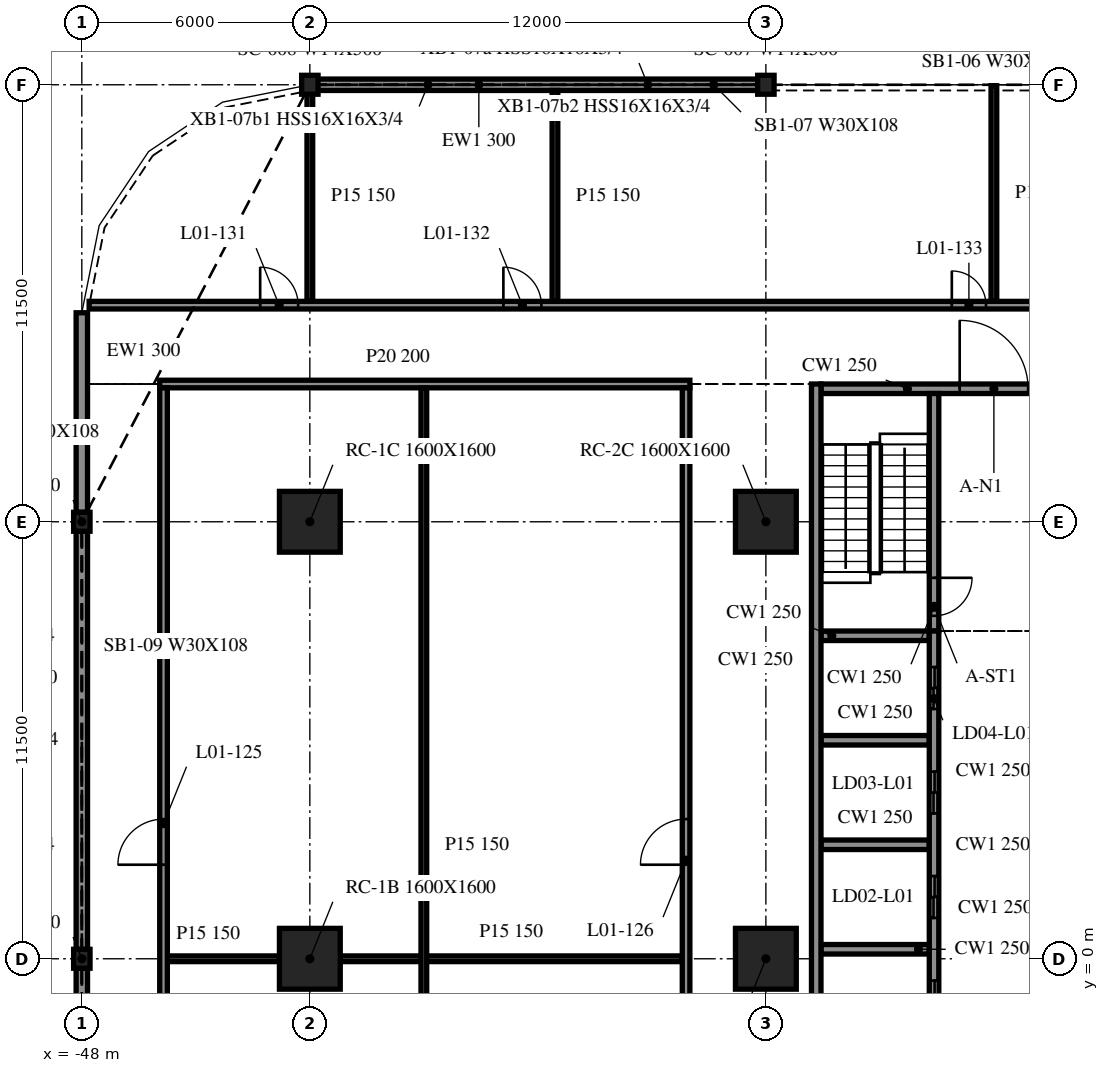
"""IFC4 building model, lengths in metres.
Left out: names, types, materials, properties, quantities, classifications, styles, units other than length and angle.
Written with IfcOpenShell. Run it as: python <this file> out.ifc"""

import sys

from ifc_helpers import new_model, si_unit, direction, frame, frame_2d, origin, origin_2d, place, context, subcontext, project, spatial, rectangle, i_section, extrude, element, fill, save


model = new_model("IFC4")
c1 = context("Model", 3, precision=1e-05, world=origin(), true_north=direction((0.0, 1.0)))
c2 = subcontext(c1, "Body", "Model", "MODEL_VIEW")
j1 = project(units=[si_unit("LENGTHUNIT", "METRE"), si_unit("PLANEANGLEUNIT", "RADIAN")], contexts=[c1])
p1 = place(None, origin())
s1 = spatial("IfcSite", under=j1, at=p1, CompositionType="ELEMENT")
p2 = place(p1, origin())
s2 = spatial("IfcBuilding", under=s1, at=p2, CompositionType="ELEMENT")
p3 = place(p2, frame((0.0, 0.0, 7.2)))
s3 = spatial("IfcBuildingStorey", under=s2, at=p3, CompositionType="ELEMENT", Elevation=7.2)
for number, where, z_axis, x_axis in (
    (1, (-42.0, 0.0, -0.34), (0.0, 0.0, 1.0), (1.0, 0.0, 0.0)),
    (2, (-42.0, 11.5, -0.34), (0.0, 0.0, 1.0), (1.0, 0.0, 0.0)),
    (3, (-30.0, 0.0, -0.34), (0.0, 0.0, 1.0), (1.0, 0.0, 0.0)),
    (4, (-30.0, 11.5, -0.34), (0.0, 0.0, 1.0), (1.0, 0.0, 0.0)),
):
    element("IfcColumn", number, at=place(p3, frame(where, z_axis=z_axis, x_axis=x_axis)), inside=s3, PredefinedType="COLUMN", context=c2, shape_type="SweptSolid", body=[
        extrude(rectangle(XDim=1.6, YDim=1.6, at=origin_2d()), origin(), (0.0, 0.0, 1.0), 4.3),
    ])
for number, where, z_axis, x_axis in (
    (5, (-30.0, 23.0, -0.34), (0.0, 0.0, 1.0), (1.0, 0.0, 0.0)),
    (6, (-42.0, 23.0, -0.34), (0.0, 0.0, 1.0), (1.0, 0.0, 0.0)),
    (7, (-48.0, 11.5, -0.34), (0.0, 0.0, 1.0), (1.0, 0.0, 0.0)),
    (8, (-48.0, 0.0, -0.34), (0.0, 0.0, 1.0), (1.0, 0.0, 0.0)),
):
    element("IfcColumn", number, at=place(p3, frame(where, z_axis=z_axis, x_axis=x_axis)), inside=s3, PredefinedType="COLUMN", context=c2, shape_type="SweptSolid", body=[
        extrude(i_section(OverallWidth=0.432, OverallDepth=0.498, WebThickness=0.056, FlangeThickness=0.089, at=origin_2d()), origin(), (0.0, 0.0, 1.0), 4.3),
    ])
p4 = place(p3, frame((-30.028, 23.0, 0.0), z_axis=(0.0, 0.0, 1.0), x_axis=(-1.0, 0.0, 0.0)))
e9 = element("IfcWall", 9, at=p4, inside=s3, PredefinedType="NOTDEFINED", context=c2, shape_type="SweptSolid", body=[
    extrude(rectangle(XDim=11.944, YDim=0.3, at=frame_2d((5.972, 0.0))), origin(), (0.0, 0.0, 1.0), 3.203),
])
p5 = place(p3, frame((-48.0, 17.0, 0.0), z_axis=(0.0, 0.0, 1.0), x_axis=(0.0, -1.0, 0.0)))
e10 = element("IfcWall", 10, at=p5, inside=s3, PredefinedType="NOTDEFINED", context=c2, shape_type="SweptSolid", body=[
    extrude(rectangle(XDim=5.251, YDim=0.3, at=frame_2d((2.625, 0.0))), origin(), (0.0, 0.0, 1.0), 3.203),
])
for number, where, z_axis, x_axis in (
    (11, (-48.0, 11.251, 0.0), (0.0, 0.0, 1.0), (0.0, -1.0, 0.0)),
    (12, (-48.0, -0.249, 0.0), (0.0, 0.0, 1.0), (0.0, -1.0, 0.0)),
):
    element("IfcWall", number, at=place(p3, frame(where, z_axis=z_axis, x_axis=x_axis)), inside=s3, PredefinedType="NOTDEFINED", context=c2, shape_type="SweptSolid", body=[
        extrude(rectangle(XDim=11.002, YDim=0.3, at=frame_2d((5.501, 0.0))), origin(), (0.0, 0.0, 1.0), 3.203),
    ])
p6 = place(p3, frame((-28.675, 15.125, 0.0), z_axis=(0.0, 0.0, 1.0), x_axis=(0.0, -1.0, 0.0)))
e13 = element("IfcWall", 13, at=p6, inside=s3, PredefinedType="SOLIDWALL", context=c2, shape_type="SweptSolid", body=[
    extrude(rectangle(XDim=24.25, YDim=0.25, at=frame_2d((12.125, 0.0))), origin(), (0.0, 0.0, 1.0), 3.96),
])
p7 = place(p3, frame((-28.55, 15.0, 0.0), z_axis=(0.0, 0.0, 1.0), x_axis=(1.0, 0.0, 0.0)))
e14 = element("IfcWall", 14, at=p7, inside=s3, PredefinedType="SOLIDWALL", context=c2, shape_type="SweptSolid", body=[
    extrude(rectangle(XDim=9.1, YDim=0.25, at=frame_2d((4.55, 0.0))), origin(), (0.0, 0.0, 1.0), 3.96),
])
p8 = place(p7, frame((3.65, 0.0, 0.0)))
e15 = element("IfcOpeningElement", 15, at=p8, cuts=e14, PredefinedType="OPENING", context=c2, shape_type="SweptSolid", body=[
    extrude(rectangle(XDim=1.8, YDim=2.1, at=frame_2d((0.9, 1.05))), frame((0.0, 0.135, 0.0), z_axis=(0.0, -1.0, 0.0), x_axis=(1.0, 0.0, 0.0)), (0.0, 0.0, 1.0), 0.27),
])
p9 = place(p3, frame((-25.575, -8.875, 0.0), z_axis=(0.0, 0.0, 1.0), x_axis=(0.0, 1.0, 0.0)))
e16 = element("IfcWall", 16, at=p9, inside=s3, PredefinedType="SOLIDWALL", context=c2, shape_type="SweptSolid", body=[
    extrude(rectangle(XDim=17.5, YDim=0.25, at=frame_2d((8.75, 0.0))), origin(), (0.0, 0.0, 1.0), 3.96),
])
p10 = place(p9, frame((7.2, 0.0, 0.0)))
e17 = element("IfcOpeningElement", 17, at=p10, cuts=e16, PredefinedType="OPENING", context=c2, shape_type="SweptSolid", body=[
    extrude(rectangle(XDim=1.1, YDim=2.1, at=frame_2d((0.55, 1.05))), frame((0.0, 0.135, 0.0), z_axis=(0.0, -1.0, 0.0), x_axis=(1.0, 0.0, 0.0)), (0.0, 0.0, 1.0), 0.27),
])
p11 = place(p9, frame((9.95, 0.0, 0.0)))
e18 = element("IfcOpeningElement", 18, at=p11, cuts=e16, PredefinedType="OPENING", context=c2, shape_type="SweptSolid", body=[
    extrude(rectangle(XDim=1.1, YDim=2.1, at=frame_2d((0.55, 1.05))), frame((0.0, 0.135, 0.0), z_axis=(0.0, -1.0, 0.0), x_axis=(1.0, 0.0, 0.0)), (0.0, 0.0, 1.0), 0.27),
])
p12 = place(p9, frame((12.7, 0.0, 0.0)))
e19 = element("IfcOpeningElement", 19, at=p12, cuts=e16, PredefinedType="OPENING", context=c2, shape_type="SweptSolid", body=[
    extrude(rectangle(XDim=1.1, YDim=2.1, at=frame_2d((0.55, 1.05))), frame((0.0, 0.135, 0.0), z_axis=(0.0, -1.0, 0.0), x_axis=(1.0, 0.0, 0.0)), (0.0, 0.0, 1.0), 0.27),
])
p13 = place(p9, frame((15.45, 0.0, 0.0)))
e20 = element("IfcOpeningElement", 20, at=p13, cuts=e16, PredefinedType="OPENING", context=c2, shape_type="SweptSolid", body=[
    extrude(rectangle(XDim=1.1, YDim=2.1, at=frame_2d((0.55, 1.05))), frame((0.0, 0.135, 0.0), z_axis=(0.0, -1.0, 0.0), x_axis=(1.0, 0.0, 0.0)), (0.0, 0.0, 1.0), 0.27),
])
p14 = place(p9, frame((0.512, 0.0, 0.0)))
e21 = element("IfcOpeningElement", 21, at=p14, cuts=e16, PredefinedType="OPENING", context=c2, shape_type="SweptSolid", body=[
    extrude(rectangle(XDim=0.9, YDim=2.1, at=frame_2d((0.45, 1.05))), frame((0.0, 0.135, 0.0), z_axis=(0.0, -1.0, 0.0), x_axis=(1.0, 0.0, 0.0)), (0.0, 0.0, 1.0), 0.27),
])
p15 = place(p9, frame((2.55, 0.0, 0.0)))
e22 = element("IfcOpeningElement", 22, at=p15, cuts=e16, PredefinedType="OPENING", context=c2, shape_type="SweptSolid", body=[
    extrude(rectangle(XDim=0.9, YDim=2.1, at=frame_2d((0.45, 1.05))), frame((0.0, 0.135, 0.0), z_axis=(0.0, -1.0, 0.0), x_axis=(1.0, 0.0, 0.0)), (0.0, 0.0, 1.0), 0.27),
])
p16 = place(p9, frame((4.587, 0.0, 0.0)))
e23 = element("IfcOpeningElement", 23, at=p16, cuts=e16, PredefinedType="OPENING", context=c2, shape_type="SweptSolid", body=[
    extrude(rectangle(XDim=0.9, YDim=2.1, at=frame_2d((0.45, 1.05))), frame((0.0, 0.135, 0.0), z_axis=(0.0, -1.0, 0.0), x_axis=(1.0, 0.0, 0.0)), (0.0, 0.0, 1.0), 0.27),
])
p17 = place(p3, frame((-25.575, 14.875, 0.0), z_axis=(0.0, 0.0, 1.0), x_axis=(0.0, -1.0, 0.0)))
e24 = element("IfcWall", 24, at=p17, inside=s3, PredefinedType="SOLIDWALL", context=c2, shape_type="SweptSolid", body=[
    extrude(rectangle(XDim=6.25, YDim=0.25, at=frame_2d((3.125, 0.0))), origin(), (0.0, 0.0, 1.0), 3.96),
])
p18 = place(p17, frame((4.85, 0.0, 0.0)))
e25 = element("IfcOpeningElement", 25, at=p18, cuts=e24, PredefinedType="OPENING", context=c2, shape_type="SweptSolid", body=[
    extrude(rectangle(XDim=1.0, YDim=2.1, at=frame_2d((0.5, 1.05))), frame((0.0, 0.135, 0.0), z_axis=(0.0, -1.0, 0.0), x_axis=(1.0, 0.0, 0.0)), (0.0, 0.0, 1.0), 0.27),
])
for number, where, z_axis, x_axis in (
    (26, (-28.55, 0.25, 0.0), (0.0, 0.0, 1.0), (1.0, 0.0, 0.0)),
    (27, (-28.55, 3.0, 0.0), (0.0, 0.0, 1.0), (1.0, 0.0, 0.0)),
    (28, (-28.55, 5.75, 0.0), (0.0, 0.0, 1.0), (1.0, 0.0, 0.0)),
    (29, (-28.55, 8.5, 0.0), (0.0, 0.0, 1.0), (1.0, 0.0, 0.0)),
):
    element("IfcWall", number, at=place(p3, frame(where, z_axis=z_axis, x_axis=x_axis)), inside=s3, PredefinedType="SOLIDWALL", context=c2, shape_type="SweptSolid", body=[
        extrude(rectangle(XDim=2.85, YDim=0.25, at=frame_2d((1.425, 0.0))), origin(), (0.0, 0.0, 1.0), 3.96),
    ])
p19 = place(p3, frame((-45.75, 0.0, 0.0), z_axis=(0.0, 0.0, 1.0), x_axis=(1.0, 0.0, 0.0)))
e30 = element("IfcWall", 30, at=p19, inside=s3, PredefinedType="PARTITIONING", context=c2, shape_type="SweptSolid", body=[
    extrude(rectangle(XDim=2.95, YDim=0.15, at=frame_2d((1.475, 0.0))), origin(), (0.0, 0.0, 1.0), 3.96),
])
p20 = place(p3, frame((-41.2, 0.0, 0.0), z_axis=(0.0, 0.0, 1.0), x_axis=(1.0, 0.0, 0.0)))
e31 = element("IfcWall", 31, at=p20, inside=s3, PredefinedType="PARTITIONING", context=c2, shape_type="SweptSolid", body=[
    extrude(rectangle(XDim=9.0, YDim=0.15, at=frame_2d((4.5, 0.0))), origin(), (0.0, 0.0, 1.0), 3.96),
])
p21 = place(p3, frame((-45.95, 15.125, 0.0), z_axis=(0.0, 0.0, 1.0), x_axis=(1.0, 0.0, 0.0)))
e32 = element("IfcWall", 32, at=p21, inside=s3, PredefinedType="PARTITIONING", context=c2, shape_type="SweptSolid", body=[
    extrude(rectangle(XDim=13.95, YDim=0.2, at=frame_2d((6.975, 0.0))), origin(), (0.0, 0.0, 1.0), 3.96),
])
p22 = place(p3, frame((-47.807, 17.2, 0.0), z_axis=(0.0, 0.0, 1.0), x_axis=(1.0, 0.0, 0.0)))
e33 = element("IfcWall", 33, at=p22, inside=s3, PredefinedType="PARTITIONING", context=c2, shape_type="SweptSolid", body=[
    extrude(rectangle(XDim=95.615, YDim=0.2, at=frame_2d((47.807, 0.0))), origin(), (0.0, 0.0, 1.0), 3.96),
])
p23 = place(p22, frame((4.5, 0.0, 0.0)))
e34 = element("IfcOpeningElement", 34, at=p23, cuts=e33, PredefinedType="OPENING", context=c2, shape_type="SweptSolid", body=[
    extrude(rectangle(XDim=1.0, YDim=2.1, at=frame_2d((0.5, 1.05))), frame((0.0, 0.11, 0.0), z_axis=(0.0, -1.0, 0.0), x_axis=(1.0, 0.0, 0.0)), (0.0, 0.0, 1.0), 0.22),
])
p24 = place(p22, frame((10.9, 0.0, 0.0)))
e35 = element("IfcOpeningElement", 35, at=p24, cuts=e33, PredefinedType="OPENING", context=c2, shape_type="SweptSolid", body=[
    extrude(rectangle(XDim=1.0, YDim=2.1, at=frame_2d((0.5, 1.05))), frame((0.0, 0.11, 0.0), z_axis=(0.0, -1.0, 0.0), x_axis=(1.0, 0.0, 0.0)), (0.0, 0.0, 1.0), 0.22),
])
p25 = place(p22, frame((22.7, 0.0, 0.0)))
e36 = element("IfcOpeningElement", 36, at=p25, cuts=e33, PredefinedType="OPENING", context=c2, shape_type="SweptSolid", body=[
    extrude(rectangle(XDim=0.9, YDim=2.1, at=frame_2d((0.45, 1.05))), frame((0.0, 0.11, 0.0), z_axis=(0.0, -1.0, 0.0), x_axis=(1.0, 0.0, 0.0)), (0.0, 0.0, 1.0), 0.22),
])
p26 = place(p22, frame((25.7, 0.0, 0.0)))
e37 = element("IfcOpeningElement", 37, at=p26, cuts=e33, PredefinedType="OPENING", context=c2, shape_type="SweptSolid", body=[
    extrude(rectangle(XDim=1.2, YDim=2.1, at=frame_2d((0.6, 1.05))), frame((0.0, 0.11, 0.0), z_axis=(0.0, -1.0, 0.0), x_axis=(1.0, 0.0, 0.0)), (0.0, 0.0, 1.0), 0.22),
])
p27 = place(p22, frame((28.7, 0.0, 0.0)))
e38 = element("IfcOpeningElement", 38, at=p27, cuts=e33, PredefinedType="OPENING", context=c2, shape_type="SweptSolid", body=[
    extrude(rectangle(XDim=0.9, YDim=2.1, at=frame_2d((0.45, 1.05))), frame((0.0, 0.11, 0.0), z_axis=(0.0, -1.0, 0.0), x_axis=(1.0, 0.0, 0.0)), (0.0, 0.0, 1.0), 0.22),
])
p28 = place(p22, frame((34.5, 0.0, 0.0)))
e39 = element("IfcOpeningElement", 39, at=p28, cuts=e33, PredefinedType="OPENING", context=c2, shape_type="SweptSolid", body=[
    extrude(rectangle(XDim=1.0, YDim=2.1, at=frame_2d((0.5, 1.05))), frame((0.0, 0.11, 0.0), z_axis=(0.0, -1.0, 0.0), x_axis=(1.0, 0.0, 0.0)), (0.0, 0.0, 1.0), 0.22),
])
p29 = place(p22, frame((46.5, 0.0, 0.0)))
e40 = element("IfcOpeningElement", 40, at=p29, cuts=e33, PredefinedType="OPENING", context=c2, shape_type="SweptSolid", body=[
    extrude(rectangle(XDim=1.0, YDim=2.1, at=frame_2d((0.5, 1.05))), frame((0.0, 0.11, 0.0), z_axis=(0.0, -1.0, 0.0), x_axis=(1.0, 0.0, 0.0)), (0.0, 0.0, 1.0), 0.22),
])
p30 = place(p22, frame((48.1, 0.0, 0.0)))
e41 = element("IfcOpeningElement", 41, at=p30, cuts=e33, PredefinedType="OPENING", context=c2, shape_type="SweptSolid", body=[
    extrude(rectangle(XDim=0.9, YDim=2.1, at=frame_2d((0.45, 1.05))), frame((0.0, 0.11, 0.0), z_axis=(0.0, -1.0, 0.0), x_axis=(1.0, 0.0, 0.0)), (0.0, 0.0, 1.0), 0.22),
])
p31 = place(p22, frame((51.5, 0.0, 0.0)))
e42 = element("IfcOpeningElement", 42, at=p31, cuts=e33, PredefinedType="OPENING", context=c2, shape_type="SweptSolid", body=[
    extrude(rectangle(XDim=1.2, YDim=2.1, at=frame_2d((0.6, 1.05))), frame((0.0, 0.11, 0.0), z_axis=(0.0, -1.0, 0.0), x_axis=(1.0, 0.0, 0.0)), (0.0, 0.0, 1.0), 0.22),
])
p32 = place(p22, frame((54.1, 0.0, 0.0)))
e43 = element("IfcOpeningElement", 43, at=p32, cuts=e33, PredefinedType="OPENING", context=c2, shape_type="SweptSolid", body=[
    extrude(rectangle(XDim=0.9, YDim=2.1, at=frame_2d((0.45, 1.05))), frame((0.0, 0.11, 0.0), z_axis=(0.0, -1.0, 0.0), x_axis=(1.0, 0.0, 0.0)), (0.0, 0.0, 1.0), 0.22),
])
p33 = place(p22, frame((60.1, 0.0, 0.0)))
e44 = element("IfcOpeningElement", 44, at=p33, cuts=e33, PredefinedType="OPENING", context=c2, shape_type="SweptSolid", body=[
    extrude(rectangle(XDim=1.0, YDim=2.1, at=frame_2d((0.5, 1.05))), frame((0.0, 0.11, 0.0), z_axis=(0.0, -1.0, 0.0), x_axis=(1.0, 0.0, 0.0)), (0.0, 0.0, 1.0), 0.22),
])
p34 = place(p22, frame((72.1, 0.0, 0.0)))
e45 = element("IfcOpeningElement", 45, at=p34, cuts=e33, PredefinedType="OPENING", context=c2, shape_type="SweptSolid", body=[
    extrude(rectangle(XDim=1.0, YDim=2.1, at=frame_2d((0.5, 1.05))), frame((0.0, 0.11, 0.0), z_axis=(0.0, -1.0, 0.0), x_axis=(1.0, 0.0, 0.0)), (0.0, 0.0, 1.0), 0.22),
])
p35 = place(p22, frame((75.5, 0.0, 0.0)))
e46 = element("IfcOpeningElement", 46, at=p35, cuts=e33, PredefinedType="OPENING", context=c2, shape_type="SweptSolid", body=[
    extrude(rectangle(XDim=0.9, YDim=2.1, at=frame_2d((0.45, 1.05))), frame((0.0, 0.11, 0.0), z_axis=(0.0, -1.0, 0.0), x_axis=(1.0, 0.0, 0.0)), (0.0, 0.0, 1.0), 0.22),
])
p36 = place(p22, frame((78.1, 0.0, 0.0)))
e47 = element("IfcOpeningElement", 47, at=p36, cuts=e33, PredefinedType="OPENING", context=c2, shape_type="SweptSolid", body=[
    extrude(rectangle(XDim=1.2, YDim=2.1, at=frame_2d((0.6, 1.05))), frame((0.0, 0.11, 0.0), z_axis=(0.0, -1.0, 0.0), x_axis=(1.0, 0.0, 0.0)), (0.0, 0.0, 1.0), 0.22),
])
p37 = place(p22, frame((84.1, 0.0, 0.0)))
e48 = element("IfcOpeningElement", 48, at=p37, cuts=e33, PredefinedType="OPENING", context=c2, shape_type="SweptSolid", body=[
    extrude(rectangle(XDim=0.9, YDim=2.1, at=frame_2d((0.45, 1.05))), frame((0.0, 0.11, 0.0), z_axis=(0.0, -1.0, 0.0), x_axis=(1.0, 0.0, 0.0)), (0.0, 0.0, 1.0), 0.22),
])
p38 = place(p3, frame((-45.85, -9.025, 0.0), z_axis=(0.0, 0.0, 1.0), x_axis=(0.0, 1.0, 0.0)))
e49 = element("IfcWall", 49, at=p38, inside=s3, PredefinedType="PARTITIONING", context=c2, shape_type="SweptSolid", body=[
    extrude(rectangle(XDim=24.05, YDim=0.2, at=frame_2d((12.025, 0.0))), origin(), (0.0, 0.0, 1.0), 3.96),
])
p39 = place(p38, frame((11.5, 0.0, 0.0)))
e50 = element("IfcOpeningElement", 50, at=p39, cuts=e49, PredefinedType="OPENING", context=c2, shape_type="SweptSolid", body=[
    extrude(rectangle(XDim=1.2, YDim=2.1, at=frame_2d((0.6, 1.05))), frame((0.0, 0.11, 0.0), z_axis=(0.0, -1.0, 0.0), x_axis=(1.0, 0.0, 0.0)), (0.0, 0.0, 1.0), 0.22),
])
p40 = place(p3, frame((-42.0, 17.3, 0.0), z_axis=(0.0, 0.0, 1.0), x_axis=(0.0, 1.0, 0.0)))
e51 = element("IfcWall", 51, at=p40, inside=s3, PredefinedType="PARTITIONING", context=c2, shape_type="SweptSolid", body=[
    extrude(rectangle(XDim=5.547, YDim=0.15, at=frame_2d((2.773, 0.0))), origin(), (0.0, 0.0, 1.0), 3.96),
])
p41 = place(p3, frame((-39.0, -9.025, 0.0), z_axis=(0.0, 0.0, 1.0), x_axis=(0.0, 1.0, 0.0)))
e52 = element("IfcWall", 52, at=p41, inside=s3, PredefinedType="PARTITIONING", context=c2, shape_type="SweptSolid", body=[
    extrude(rectangle(XDim=24.05, YDim=0.15, at=frame_2d((12.025, 0.0))), origin(), (0.0, 0.0, 1.0), 3.96),
])
p42 = place(p3, frame((-35.55, 17.3, 0.0), z_axis=(0.0, 0.0, 1.0), x_axis=(0.0, 1.0, 0.0)))
e53 = element("IfcWall", 53, at=p42, inside=s3, PredefinedType="PARTITIONING", context=c2, shape_type="SweptSolid", body=[
    extrude(rectangle(XDim=5.55, YDim=0.15, at=frame_2d((2.775, 0.0))), origin(), (0.0, 0.0, 1.0), 3.96),
])
p43 = place(p3, frame((-32.1, -9.025, 0.0), z_axis=(0.0, 0.0, 1.0), x_axis=(0.0, 1.0, 0.0)))
e54 = element("IfcWall", 54, at=p43, inside=s3, PredefinedType="PARTITIONING", context=c2, shape_type="SweptSolid", body=[
    extrude(rectangle(XDim=24.05, YDim=0.2, at=frame_2d((12.025, 0.0))), origin(), (0.0, 0.0, 1.0), 3.96),
])
p44 = place(p43, frame((11.5, 0.0, 0.0)))
e55 = element("IfcOpeningElement", 55, at=p44, cuts=e54, PredefinedType="OPENING", context=c2, shape_type="SweptSolid", body=[
    extrude(rectangle(XDim=1.2, YDim=2.1, at=frame_2d((0.6, 1.05))), frame((0.0, 0.11, 0.0), z_axis=(0.0, -1.0, 0.0), x_axis=(1.0, 0.0, 0.0)), (0.0, 0.0, 1.0), 0.22),
])
p45 = place(p3, frame((-24.0, 17.3, 0.0), z_axis=(0.0, 0.0, 1.0), x_axis=(0.0, 1.0, 0.0)))
e56 = element("IfcWall", 56, at=p45, inside=s3, PredefinedType="PARTITIONING", context=c2, shape_type="SweptSolid", body=[
    extrude(rectangle(XDim=5.675, YDim=0.15, at=frame_2d((2.837, 0.0))), origin(), (0.0, 0.0, 1.0), 3.96),
])
p46 = place(p8, origin())
e57 = element("IfcDoor", 57, at=p46, inside=s3, OperationType="DOUBLE_DOOR_SINGLE_SWING", PredefinedType="DOOR", context=c2, shape_type="SweptSolid", body=[
    extrude(rectangle(XDim=1.8, YDim=2.1, at=frame_2d((0.9, 1.05))), frame((0.0, 0.025, 0.0), z_axis=(0.0, -1.0, 0.0), x_axis=(1.0, 0.0, 0.0)), (0.0, 0.0, 1.0), 0.05),
])
fill(e15, e57)
p47 = place(p10, origin())
e58 = element("IfcDoor", 58, at=p47, inside=s3, OperationType="DOUBLE_DOOR_SLIDING", PredefinedType="DOOR", context=c2, shape_type="SweptSolid", body=[
    extrude(rectangle(XDim=1.1, YDim=2.1, at=frame_2d((0.55, 1.05))), frame((0.0, 0.025, 0.0), z_axis=(0.0, -1.0, 0.0), x_axis=(1.0, 0.0, 0.0)), (0.0, 0.0, 1.0), 0.05),
])
fill(e17, e58)
p48 = place(p11, origin())
e59 = element("IfcDoor", 59, at=p48, inside=s3, OperationType="DOUBLE_DOOR_SLIDING", PredefinedType="DOOR", context=c2, shape_type="SweptSolid", body=[
    extrude(rectangle(XDim=1.1, YDim=2.1, at=frame_2d((0.55, 1.05))), frame((0.0, 0.025, 0.0), z_axis=(0.0, -1.0, 0.0), x_axis=(1.0, 0.0, 0.0)), (0.0, 0.0, 1.0), 0.05),
])
fill(e18, e59)
p49 = place(p12, origin())
e60 = element("IfcDoor", 60, at=p49, inside=s3, OperationType="DOUBLE_DOOR_SLIDING", PredefinedType="DOOR", context=c2, shape_type="SweptSolid", body=[
    extrude(rectangle(XDim=1.1, YDim=2.1, at=frame_2d((0.55, 1.05))), frame((0.0, 0.025, 0.0), z_axis=(0.0, -1.0, 0.0), x_axis=(1.0, 0.0, 0.0)), (0.0, 0.0, 1.0), 0.05),
])
fill(e19, e60)
p50 = place(p13, origin())
e61 = element("IfcDoor", 61, at=p50, inside=s3, OperationType="DOUBLE_DOOR_SLIDING", PredefinedType="DOOR", context=c2, shape_type="SweptSolid", body=[
    extrude(rectangle(XDim=1.1, YDim=2.1, at=frame_2d((0.55, 1.05))), frame((0.0, 0.025, 0.0), z_axis=(0.0, -1.0, 0.0), x_axis=(1.0, 0.0, 0.0)), (0.0, 0.0, 1.0), 0.05),
])
fill(e20, e61)
p51 = place(p18, origin())
e62 = element("IfcDoor", 62, at=p51, inside=s3, OperationType="SINGLE_SWING_LEFT", PredefinedType="DOOR", context=c2, shape_type="SweptSolid", body=[
    extrude(rectangle(XDim=1.0, YDim=2.1, at=frame_2d((0.5, 1.05))), frame((0.0, 0.025, 0.0), z_axis=(0.0, -1.0, 0.0), x_axis=(1.0, 0.0, 0.0)), (0.0, 0.0, 1.0), 0.05),
])
fill(e25, e62)
p52 = place(p39, origin())
e63 = element("IfcDoor", 63, at=p52, inside=s3, OperationType="SINGLE_SWING_LEFT", PredefinedType="DOOR", context=c2, shape_type="SweptSolid", body=[
    extrude(rectangle(XDim=1.2, YDim=2.1, at=frame_2d((0.6, 1.05))), frame((0.0, 0.025, 0.0), z_axis=(0.0, -1.0, 0.0), x_axis=(1.0, 0.0, 0.0)), (0.0, 0.0, 1.0), 0.05),
])
fill(e50, e63)
p53 = place(p44, origin())
e64 = element("IfcDoor", 64, at=p53, inside=s3, OperationType="SINGLE_SWING_RIGHT", PredefinedType="DOOR", context=c2, shape_type="SweptSolid", body=[
    extrude(rectangle(XDim=1.2, YDim=2.1, at=frame_2d((0.6, 1.05))), frame((0.0, 0.025, 0.0), z_axis=(0.0, -1.0, 0.0), x_axis=(1.0, 0.0, 0.0)), (0.0, 0.0, 1.0), 0.05),
])
fill(e55, e64)
p54 = place(p23, origin())
e65 = element("IfcDoor", 65, at=p54, inside=s3, OperationType="SINGLE_SWING_LEFT", PredefinedType="DOOR", context=c2, shape_type="SweptSolid", body=[
    extrude(rectangle(XDim=1.0, YDim=2.1, at=frame_2d((0.5, 1.05))), frame((0.0, 0.025, 0.0), z_axis=(0.0, -1.0, 0.0), x_axis=(1.0, 0.0, 0.0)), (0.0, 0.0, 1.0), 0.05),
])
fill(e34, e65)
p55 = place(p24, origin())
e66 = element("IfcDoor", 66, at=p55, inside=s3, OperationType="SINGLE_SWING_LEFT", PredefinedType="DOOR", context=c2, shape_type="SweptSolid", body=[
    extrude(rectangle(XDim=1.0, YDim=2.1, at=frame_2d((0.5, 1.05))), frame((0.0, 0.025, 0.0), z_axis=(0.0, -1.0, 0.0), x_axis=(1.0, 0.0, 0.0)), (0.0, 0.0, 1.0), 0.05),
])
fill(e35, e66)
p56 = place(p25, origin())
e67 = element("IfcDoor", 67, at=p56, inside=s3, OperationType="SINGLE_SWING_LEFT", PredefinedType="DOOR", context=c2, shape_type="SweptSolid", body=[
    extrude(rectangle(XDim=0.9, YDim=2.1, at=frame_2d((0.45, 1.05))), frame((0.0, 0.025, 0.0), z_axis=(0.0, -1.0, 0.0), x_axis=(1.0, 0.0, 0.0)), (0.0, 0.0, 1.0), 0.05),
])
fill(e36, e67)
save(model, sys.argv[1])
